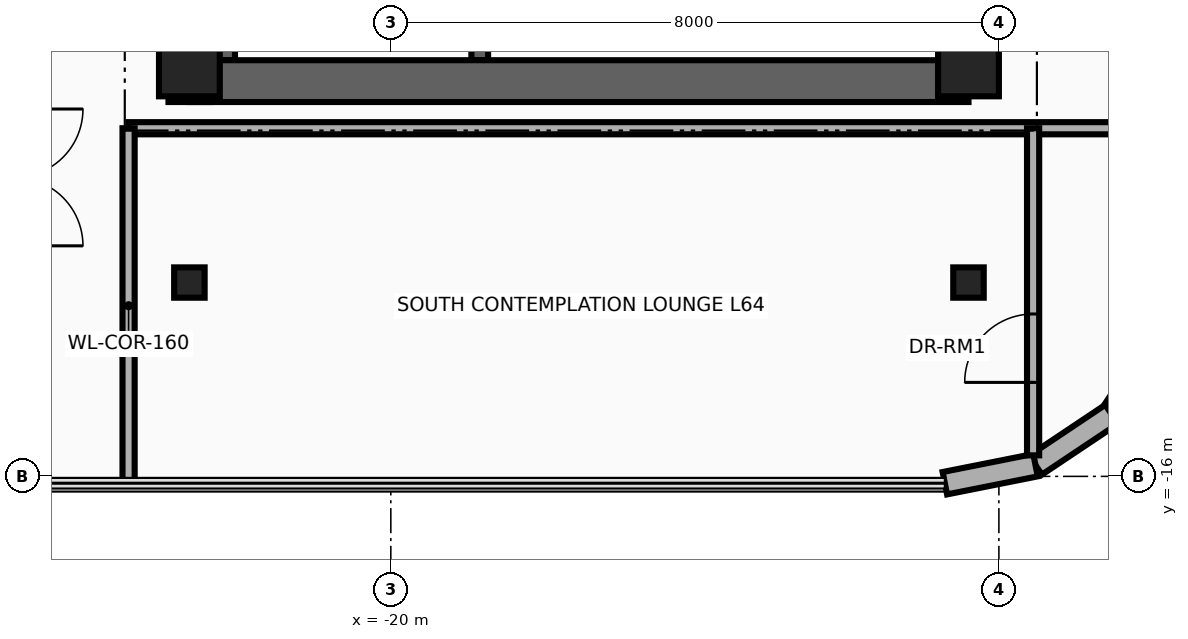
"""IFC4 building model, lengths in metres.
Left out: names, types, materials, properties, quantities, classifications, styles, units other than length and angle.
Written with IfcOpenShell. Run it as: python <this file> out.ifc"""

import sys

from ifc_helpers import new_model, si_unit, direction, frame, frame_2d, origin, origin_2d, place, context, subcontext, project, spatial, rectangle, i_section, extrude, source, transform, mapped, element, fill, save


model = new_model("IFC4")
c1 = context("Model", 3, precision=1e-05, world=origin(), true_north=direction((0.0, 1.0)))
c2 = subcontext(c1, "Body", "Model", "MODEL_VIEW")
j1 = project(units=[si_unit("LENGTHUNIT", "METRE"), si_unit("PLANEANGLEUNIT", "RADIAN")], contexts=[c1])
p1 = place(None, origin())
s1 = spatial("IfcSite", under=j1, at=p1, CompositionType="ELEMENT")
p2 = place(p1, origin())
s2 = spatial("IfcBuilding", under=s1, at=p2, CompositionType="ELEMENT")
p3 = place(p2, frame((0.0, 0.0, 247.5)))
s3 = spatial("IfcBuildingStorey", under=s2, at=p3, CompositionType="ELEMENT", Elevation=247.5)
for number, where, z_axis, x_axis in (
    (1, (-22.16, -10.525, 0.0), (0.0, 0.0, 1.0), (0.0, 1.0, 0.0)),
    (2, (-18.83, -10.525, 0.0), (0.0, 0.0, 1.0), (0.0, 1.0, 0.0)),
):
    element("IfcWall", number, at=place(p3, frame(where, z_axis=z_axis, x_axis=x_axis)), inside=s3, PredefinedType="SHEAR", context=c2, shape_type="SweptSolid", body=[
        extrude(rectangle(XDim=8.745, YDim=0.22, at=frame_2d((4.373, 0.0))), origin(), (0.0, 0.0, 1.0), 3.26),
    ])
p4 = place(p3, frame((-22.65, -11.075, 0.0), z_axis=(0.0, 0.0, 1.0), x_axis=(0.0, 1.0, 0.0)))
e3 = element("IfcWall", 3, at=p4, inside=s3, PredefinedType="SHEAR", context=c2, shape_type="SweptSolid", body=[
    extrude(rectangle(XDim=22.15, YDim=0.55, at=frame_2d((11.075, 0.0))), origin(), (0.0, 0.0, 1.0), 3.26),
])
p5 = place(p3, frame((-22.65, -10.8, 0.0), z_axis=(0.0, 0.0, 1.0), x_axis=(1.0, 0.0, 0.0)))
e4 = element("IfcWall", 4, at=p5, inside=s3, PredefinedType="SHEAR", context=c2, shape_type="SweptSolid", body=[
    extrude(rectangle(XDim=10.25, YDim=0.55, at=frame_2d((5.125, 0.0))), origin(), (0.0, 0.0, 1.0), 3.26),
])
m1 = source(origin(), c2, "Body", "SweptSolid", [
    extrude(rectangle(XDim=0.8, YDim=0.8, at=origin_2d()), origin(), (0.0, 0.0, 1.0), 3.5),
])
for number, where, z_axis, x_axis in (
    (5, (-22.65, -10.6, 0.0), (0.0, 0.0, 1.0), (1.0, 0.0, 0.0)),
    (6, (-12.4, -10.6, 0.0), (0.0, 0.0, 1.0), (1.0, 0.0, 0.0)),
):
    element("IfcColumn", number, at=place(p3, frame(where, z_axis=z_axis, x_axis=x_axis)), inside=s3, PredefinedType="COLUMN", context=c2, shape_type="MappedRepresentation", body=[
        mapped(m1, transform((0.0, 0.0, 0.0), x_axis=(1.0, 0.0, 0.0), y_axis=(0.0, 1.0, 0.0), z_axis=(0.0, 0.0, 1.0), scale=1.0)),
    ])
m2 = source(origin(), c2, "Body", "SweptSolid", [
    extrude(i_section(OverallWidth=0.401, OverallDepth=0.399, WebThickness=0.025, FlangeThickness=0.04, at=origin_2d()), origin(), (0.0, 0.0, 1.0), 3.5),
])
for number, where, z_axis, x_axis in (
    (7, (-22.65, -13.45, 0.0), (0.0, 0.0, 1.0), (1.0, 0.0, 0.0)),
    (8, (-12.4, -13.45, 0.0), (0.0, 0.0, 1.0), (1.0, 0.0, 0.0)),
):
    element("IfcColumn", number, at=place(p3, frame(where, z_axis=z_axis, x_axis=x_axis)), inside=s3, PredefinedType="COLUMN", context=c2, shape_type="MappedRepresentation", body=[
        mapped(m2, transform((0.0, 0.0, 0.0), x_axis=(1.0, 0.0, 0.0), y_axis=(0.0, 1.0, 0.0), z_axis=(0.0, 0.0, 1.0), scale=1.0)),
    ])
for number, where, z_axis, x_axis in (
    (9, (-9.847, -14.182, 0.0), (0.0, 0.0, 1.0), (-0.556, -0.831, 0.0)),
    (10, (-10.517, -15.183, 0.0), (0.0, 0.0, 1.0), (-0.831, -0.556, 0.0)),
):
    element("IfcWall", number, at=place(p3, frame(where, z_axis=z_axis, x_axis=x_axis)), inside=s3, PredefinedType="SOLIDWALL", context=c2, shape_type="SweptSolid", body=[
        extrude(rectangle(XDim=1.205, YDim=0.3, at=frame_2d((0.603, 0.0))), origin(), (0.0, 0.0, 1.0), 3.26),
    ])
p6 = place(p3, frame((-11.518, -15.853, 0.0), z_axis=(0.0, 0.0, 1.0), x_axis=(-0.980765602568, -0.195189223115, 0.0)))
e11 = element("IfcWall", 11, at=p6, inside=s3, PredefinedType="SOLIDWALL", context=c2, shape_type="SweptSolid", body=[
    extrude(rectangle(XDim=1.216, YDim=0.3, at=frame_2d((0.608, 0.0))), origin(), (0.0, 0.0, 1.0), 3.26),
])
p7 = place(p3, frame((-23.45, -11.42, 0.0), z_axis=(0.0, 0.0, 1.0), x_axis=(1.0, 0.0, 0.0)))
e12 = element("IfcWall", 12, at=p7, inside=s3, PredefinedType="PARTITIONING", context=c2, shape_type="SweptSolid", body=[
    extrude(rectangle(XDim=13.84, YDim=0.16, at=frame_2d((6.92, 0.0))), origin(), (0.0, 0.0, 1.0), 2.634),
])
p8 = place(p3, frame((-23.45, -16.09, 0.0), z_axis=(0.0, 0.0, 1.0), x_axis=(0.0, 1.0, 0.0)))
e13 = element("IfcWall", 13, at=p8, inside=s3, PredefinedType="PARTITIONING", context=c2, shape_type="SweptSolid", body=[
    extrude(rectangle(XDim=4.67, YDim=0.16, at=frame_2d((2.335, 0.0))), origin(), (0.0, 0.0, 1.0), 3.26),
])
p9 = place(p3, frame((-11.55, -15.724, 0.0), z_axis=(0.0, 0.0, 1.0), x_axis=(0.0, 1.0, 0.0)))
e14 = element("IfcWall", 14, at=p9, inside=s3, PredefinedType="PARTITIONING", context=c2, shape_type="SweptSolid", body=[
    extrude(rectangle(XDim=4.304, YDim=0.16, at=frame_2d((2.152, 0.0))), origin(), (0.0, 0.0, 1.0), 3.26),
])
p10 = place(p9, frame((0.96, 0.0, 0.0)))
e15 = element("IfcOpeningElement", 15, at=p10, cuts=e14, PredefinedType="OPENING", context=c2, shape_type="SweptSolid", body=[
    extrude(rectangle(XDim=0.9, YDim=2.1, at=frame_2d((0.45, 1.05))), frame((0.0, 0.095, 0.0), z_axis=(0.0, -1.0, 0.0), x_axis=(1.0, 0.0, 0.0)), (0.0, 0.0, 1.0), 0.19),
])
p11 = place(p10, origin())
e16 = element("IfcDoor", 16, at=p11, inside=s3, OperationType="SINGLE_SWING_RIGHT", PredefinedType="DOOR", context=c2, shape_type="SweptSolid", body=[
    extrude(rectangle(XDim=0.9, YDim=2.1, at=frame_2d((0.45, 1.05))), frame((0.0, 0.025, 0.0), z_axis=(0.0, -1.0, 0.0), x_axis=(1.0, 0.0, 0.0)), (0.0, 0.0, 1.0), 0.05),
])
fill(e15, e16)
save(model, sys.argv[1])
